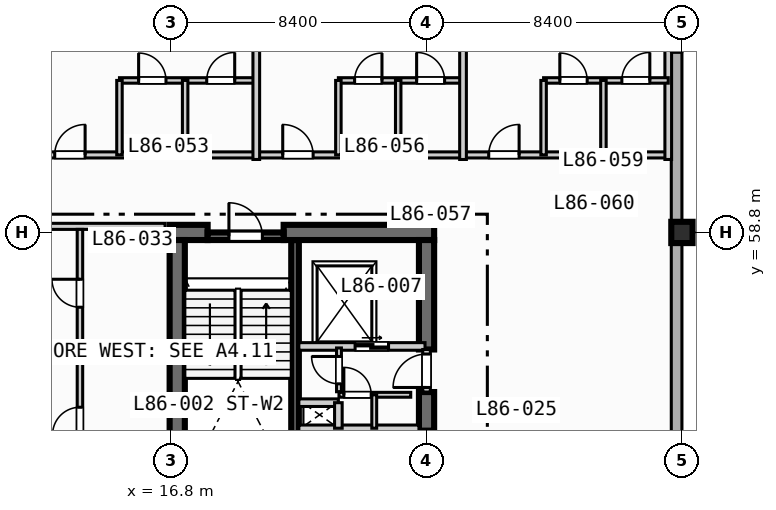
"""IFC4 building model, lengths in metres.
Left out: names, types, materials, properties, quantities, classifications, styles, units other than length and angle.
Written with IfcOpenShell. Run it as: python <this file> out.ifc"""

import sys

from ifc_helpers import new_model, si_unit, direction, frame, frame_2d, origin, origin_2d, place, context, subcontext, project, spatial, rectangle, extrude, element, fill, save


model = new_model("IFC4")
c1 = context("Model", 3, precision=1e-05, world=origin(), true_north=direction((0.0, 1.0)))
c2 = subcontext(c1, "Body", "Model", "MODEL_VIEW")
j1 = project(units=[si_unit("LENGTHUNIT", "METRE"), si_unit("PLANEANGLEUNIT", "RADIAN")], contexts=[c1])
p1 = place(None, origin())
s1 = spatial("IfcSite", under=j1, at=p1, CompositionType="ELEMENT")
p2 = place(p1, origin())
s2 = spatial("IfcBuilding", under=s1, at=p2, CompositionType="ELEMENT")
p3 = place(p2, frame((0.0, 0.0, 347.6)))
s3 = spatial("IfcBuildingStorey", under=s2, at=p3, CompositionType="ELEMENT", Elevation=347.6)
p4 = place(p3, frame((20.875, 50.5, 0.0), z_axis=(0.0, 0.0, 1.0), x_axis=(0.0, 1.0, 0.0)))
e1 = element("IfcWall", 1, at=p4, inside=s3, PredefinedType="SOLIDWALL", context=c2, shape_type="SweptSolid", body=[
    extrude(rectangle(XDim=8.05, YDim=0.25, at=frame_2d((4.025, 0.0))), origin(), (0.0, 0.0, 1.0), 3.67),
])
p5 = place(p3, frame((16.75, 58.8, 0.0), z_axis=(0.0, 0.0, 1.0), x_axis=(1.0, 0.0, 0.0)))
e2 = element("IfcWall", 2, at=p5, inside=s3, PredefinedType="SHEAR", context=c2, shape_type="SweptSolid", body=[
    extrude(rectangle(XDim=1.25, YDim=0.5, at=frame_2d((0.625, 0.0))), origin(), (0.0, 0.0, 1.0), 3.67),
])
p6 = place(p3, frame((20.5, 58.8, 0.0), z_axis=(0.0, 0.0, 1.0), x_axis=(1.0, 0.0, 0.0)))
e3 = element("IfcWall", 3, at=p6, inside=s3, PredefinedType="SHEAR", context=c2, shape_type="SweptSolid", body=[
    extrude(rectangle(XDim=4.95, YDim=0.5, at=frame_2d((2.475, 0.0))), origin(), (0.0, 0.0, 1.0), 3.67),
])
p7 = place(p3, frame((17.0, 42.2, 0.0), z_axis=(0.0, 0.0, 1.0), x_axis=(0.0, 1.0, 0.0)))
e4 = element("IfcWall", 4, at=p7, inside=s3, PredefinedType="SHEAR", context=c2, shape_type="SweptSolid", body=[
    extrude(rectangle(XDim=16.35, YDim=0.5, at=frame_2d((8.175, 0.0))), origin(), (0.0, 0.0, 1.0), 3.67),
])
p8 = place(p3, frame((25.2, 52.28, 0.0), z_axis=(0.0, 0.0, 1.0), x_axis=(0.0, 1.0, 0.0)))
e5 = element("IfcWall", 5, at=p8, inside=s3, PredefinedType="SHEAR", context=c2, shape_type="SweptSolid", body=[
    extrude(rectangle(XDim=1.27, YDim=0.5, at=frame_2d((0.635, 0.0))), origin(), (0.0, 0.0, 1.0), 3.67),
])
p9 = place(p3, frame((25.2, 54.95, 0.0), z_axis=(0.0, 0.0, 1.0), x_axis=(0.0, 1.0, 0.0)))
e6 = element("IfcWall", 6, at=p9, inside=s3, PredefinedType="SHEAR", context=c2, shape_type="SweptSolid", body=[
    extrude(rectangle(XDim=3.6, YDim=0.5, at=frame_2d((1.8, 0.0))), origin(), (0.0, 0.0, 1.0), 3.67),
])
p10 = place(p3, frame((33.6, 58.8, 0.0), z_axis=(0.0, 0.0, 1.0), x_axis=(1.0, 0.0, 0.0)))
e7 = element("IfcColumn", 7, at=p10, inside=s3, PredefinedType="COLUMN", context=c2, shape_type="SweptSolid", body=[
    extrude(rectangle(XDim=0.7, YDim=0.7, at=origin_2d()), origin(), (0.0, 0.0, 1.0), 3.9),
])
p11 = place(p3, frame((33.425, 72.425, 0.0), z_axis=(0.0, 0.0, 1.0), x_axis=(0.0, -1.0, 0.0)))
e8 = element("IfcWall", 8, at=p11, inside=s3, PredefinedType="STANDARD", context=c2, shape_type="SweptSolid", body=[
    extrude(rectangle(XDim=39.0, YDim=0.35, at=frame_2d((19.5, 0.0))), origin(), (0.0, 0.0, 1.0), 3.67),
])
p12 = place(p11, frame((5.9, 0.0, 0.85)))
e9 = element("IfcOpeningElement", 9, at=p12, cuts=e8, PredefinedType="OPENING", context=c2, shape_type="SweptSolid", body=[
    extrude(rectangle(XDim=1.8, YDim=1.8, at=frame_2d((0.9, 0.9))), frame((0.0, 0.185, 0.0), z_axis=(0.0, -1.0, 0.0), x_axis=(1.0, 0.0, 0.0)), (0.0, 0.0, 1.0), 0.37),
])
p13 = place(p3, frame((18.0, 58.675, 0.0), z_axis=(0.0, 0.0, 1.0), x_axis=(1.0, 0.0, 0.0)))
e10 = element("IfcWall", 10, at=p13, inside=s3, PredefinedType="SOLIDWALL", context=c2, shape_type="SweptSolid", body=[
    extrude(rectangle(XDim=2.5, YDim=0.25, at=frame_2d((1.25, 0.0))), origin(), (0.0, 0.0, 1.0), 3.67),
])
p14 = place(p13, frame((0.7, 0.0, 0.0)))
e11 = element("IfcOpeningElement", 11, at=p14, cuts=e10, PredefinedType="OPENING", context=c2, shape_type="SweptSolid", body=[
    extrude(rectangle(XDim=1.1, YDim=2.15, at=frame_2d((0.55, 1.075))), frame((0.0, 0.135, 0.0), z_axis=(0.0, -1.0, 0.0), x_axis=(1.0, 0.0, 0.0)), (0.0, 0.0, 1.0), 0.27),
])
p15 = place(p3, frame((21.0, 52.34, 0.0), z_axis=(0.0, 0.0, 1.0), x_axis=(1.0, 0.0, 0.0)))
e12 = element("IfcWall", 12, at=p15, inside=s3, PredefinedType="SOLIDWALL", context=c2, shape_type="SweptSolid", body=[
    extrude(rectangle(XDim=3.95, YDim=0.25, at=frame_2d((1.975, 0.0))), origin(), (0.0, 0.0, 1.0), 3.67),
])
p16 = place(p3, frame((21.0, 55.05, 0.0), z_axis=(0.0, 0.0, 1.0), x_axis=(1.0, 0.0, 0.0)))
e13 = element("IfcWall", 13, at=p16, inside=s3, PredefinedType="SOLIDWALL", context=c2, shape_type="SweptSolid", body=[
    extrude(rectangle(XDim=4.15, YDim=0.25, at=frame_2d((2.075, 0.0))), origin(), (0.0, 0.0, 1.0), 3.67),
])
p17 = place(p16, frame((1.85, 0.0, 0.0)))
e14 = element("IfcOpeningElement", 14, at=p17, cuts=e13, PredefinedType="OPENING", context=c2, shape_type="SweptSolid", body=[
    extrude(rectangle(XDim=1.1, YDim=2.15, at=frame_2d((0.55, 1.075))), frame((0.0, 0.135, 0.0), z_axis=(0.0, -1.0, 0.0), x_axis=(1.0, 0.0, 0.0)), (0.0, 0.0, 1.0), 0.27),
])
p18 = place(p3, frame((25.2, 53.55, 0.0), z_axis=(0.0, 0.0, 1.0), x_axis=(0.0, 1.0, 0.0)))
e15 = element("IfcWall", 15, at=p18, inside=s3, PredefinedType="SOLIDWALL", context=c2, shape_type="SweptSolid", body=[
    extrude(rectangle(XDim=1.4, YDim=0.25, at=frame_2d((0.7, 0.0))), origin(), (0.0, 0.0, 1.0), 3.67),
])
p19 = place(p18, frame((0.15, 0.0, 0.0)))
e16 = element("IfcOpeningElement", 16, at=p19, cuts=e15, PredefinedType="OPENING", context=c2, shape_type="SweptSolid", body=[
    extrude(rectangle(XDim=1.1, YDim=2.15, at=frame_2d((0.55, 1.075))), frame((0.0, 0.135, 0.0), z_axis=(0.0, -1.0, 0.0), x_axis=(1.0, 0.0, 0.0)), (0.0, 0.0, 1.0), 0.27),
])
p20 = place(p3, frame((21.0, 53.2, 0.0), z_axis=(0.0, 0.0, 1.0), x_axis=(1.0, 0.0, 0.0)))
e17 = element("IfcWall", 17, at=p20, inside=s3, PredefinedType="SOLIDWALL", context=c2, shape_type="SweptSolid", body=[
    extrude(rectangle(XDim=1.3, YDim=0.25, at=frame_2d((0.65, 0.0))), origin(), (0.0, 0.0, 1.0), 3.67),
])
p21 = place(p3, frame((22.3, 52.36, 0.0), z_axis=(0.0, 0.0, 1.0), x_axis=(0.0, 1.0, 0.0)))
e18 = element("IfcWall", 18, at=p21, inside=s3, PredefinedType="SOLIDWALL", context=c2, shape_type="SweptSolid", body=[
    extrude(rectangle(XDim=0.84, YDim=0.25, at=frame_2d((0.42, 0.0))), origin(), (0.0, 0.0, 1.0), 3.67),
])
p22 = place(p3, frame((22.32, 53.56, 0.0), z_axis=(0.0, 0.0, 1.0), x_axis=(0.0, 1.0, 0.0)))
e19 = element("IfcWall", 19, at=p22, inside=s3, PredefinedType="PARTITIONING", context=c2, shape_type="SweptSolid", body=[
    extrude(rectangle(XDim=1.44, YDim=0.16, at=frame_2d((0.72, 0.0))), origin(), (0.0, 0.0, 1.0), 3.67),
])
p23 = place(p22, frame((0.26, 0.0, 0.0)))
e20 = element("IfcOpeningElement", 20, at=p23, cuts=e19, PredefinedType="OPENING", context=c2, shape_type="SweptSolid", body=[
    extrude(rectangle(XDim=0.9, YDim=2.1, at=frame_2d((0.45, 1.05))), frame((0.0, 0.09, 0.0), z_axis=(0.0, -1.0, 0.0), x_axis=(1.0, 0.0, 0.0)), (0.0, 0.0, 1.0), 0.18),
])
p24 = place(p3, frame((22.32, 53.46, 0.0), z_axis=(0.0, 0.0, 1.0), x_axis=(1.0, 0.0, 0.0)))
e21 = element("IfcWall", 21, at=p24, inside=s3, PredefinedType="PARTITIONING", context=c2, shape_type="SweptSolid", body=[
    extrude(rectangle(XDim=2.36, YDim=0.16, at=frame_2d((1.18, 0.0))), origin(), (0.0, 0.0, 1.0), 3.67),
])
p25 = place(p24, frame((0.16, 0.0, 0.0)))
e22 = element("IfcOpeningElement", 22, at=p25, cuts=e21, PredefinedType="OPENING", context=c2, shape_type="SweptSolid", body=[
    extrude(rectangle(XDim=0.9, YDim=2.1, at=frame_2d((0.45, 1.05))), frame((0.0, 0.09, 0.0), z_axis=(0.0, -1.0, 0.0), x_axis=(1.0, 0.0, 0.0)), (0.0, 0.0, 1.0), 0.18),
])
p26 = place(p3, frame((23.48, 52.36, 0.0), z_axis=(0.0, 0.0, 1.0), x_axis=(0.0, 1.0, 0.0)))
e23 = element("IfcWall", 23, at=p26, inside=s3, PredefinedType="PARTITIONING", context=c2, shape_type="SweptSolid", body=[
    extrude(rectangle(XDim=1.1, YDim=0.16, at=frame_2d((0.55, 0.0))), origin(), (0.0, 0.0, 1.0), 3.67),
])
p27 = place(p3, frame((8.65, 59.0, 0.0), z_axis=(0.0, 0.0, 1.0), x_axis=(1.0, 0.0, 0.0)))
e24 = element("IfcWall", 24, at=p27, inside=s3, PredefinedType="PARTITIONING", context=c2, shape_type="SweptSolid", body=[
    extrude(rectangle(XDim=7.95, YDim=0.2, at=frame_2d((3.975, 0.0))), origin(), (0.0, 0.0, 1.0), 3.07),
])
p28 = place(p27, frame((2.0, 0.0, 0.0)))
e25 = element("IfcOpeningElement", 25, at=p28, cuts=e24, PredefinedType="OPENING", context=c2, shape_type="SweptSolid", body=[
    extrude(rectangle(XDim=1.0, YDim=2.15, at=frame_2d((0.5, 1.075))), frame((0.0, 0.11, 0.0), z_axis=(0.0, -1.0, 0.0), x_axis=(1.0, 0.0, 0.0)), (0.0, 0.0, 1.0), 0.22),
])
p29 = place(p3, frame((13.8, 50.5, 0.0), z_axis=(0.0, 0.0, 1.0), x_axis=(0.0, 1.0, 0.0)))
e26 = element("IfcWall", 26, at=p29, inside=s3, PredefinedType="PLUMBINGWALL", context=c2, shape_type="SweptSolid", body=[
    extrude(rectangle(XDim=8.4, YDim=0.18, at=frame_2d((4.2, 0.0))), origin(), (0.0, 0.0, 1.0), 3.67),
])
p30 = place(p29, frame((1.65, 0.0, 0.0)))
e27 = element("IfcOpeningElement", 27, at=p30, cuts=e26, PredefinedType="OPENING", context=c2, shape_type="SweptSolid", body=[
    extrude(rectangle(XDim=0.9, YDim=2.1, at=frame_2d((0.45, 1.05))), frame((0.0, 0.1, 0.0), z_axis=(0.0, -1.0, 0.0), x_axis=(1.0, 0.0, 0.0)), (0.0, 0.0, 1.0), 0.2),
])
p31 = place(p29, frame((5.84, 0.0, 0.0)))
e28 = element("IfcOpeningElement", 28, at=p31, cuts=e26, PredefinedType="OPENING", context=c2, shape_type="SweptSolid", body=[
    extrude(rectangle(XDim=0.92, YDim=2.1, at=frame_2d((0.46, 1.05))), frame((0.0, 0.1, 0.0), z_axis=(0.0, -1.0, 0.0), x_axis=(1.0, 0.0, 0.0)), (0.0, 0.0, 1.0), 0.2),
])
p32 = place(p3, frame((13.8, 54.7, 0.0), z_axis=(0.0, 0.0, 1.0), x_axis=(1.0, 0.0, 0.0)))
e29 = element("IfcWall", 29, at=p32, inside=s3, PredefinedType="PLUMBINGWALL", context=c2, shape_type="SweptSolid", body=[
    extrude(rectangle(XDim=2.8, YDim=0.18, at=frame_2d((1.4, 0.0))), origin(), (0.0, 0.0, 1.0), 3.67),
])
p33 = place(p3, frame((11.8, 61.35, 0.0), z_axis=(0.0, 0.0, 1.0), x_axis=(1.0, 0.0, 0.0)))
e30 = element("IfcWall", 30, at=p33, inside=s3, PredefinedType="PARTITIONING", context=c2, shape_type="SweptSolid", body=[
    extrude(rectangle(XDim=21.35, YDim=0.2, at=frame_2d((10.675, 0.0))), origin(), (0.0, 0.0, 1.0), 3.67),
])
p34 = place(p33, frame((1.17, 0.0, 0.0)))
e31 = element("IfcOpeningElement", 31, at=p34, cuts=e30, PredefinedType="OPENING", context=c2, shape_type="SweptSolid", body=[
    extrude(rectangle(XDim=1.0, YDim=2.15, at=frame_2d((0.5, 1.075))), frame((0.0, 0.11, 0.0), z_axis=(0.0, -1.0, 0.0), x_axis=(1.0, 0.0, 0.0)), (0.0, 0.0, 1.0), 0.22),
])
p35 = place(p33, frame((8.67, 0.0, 0.0)))
e32 = element("IfcOpeningElement", 32, at=p35, cuts=e30, PredefinedType="OPENING", context=c2, shape_type="SweptSolid", body=[
    extrude(rectangle(XDim=1.0, YDim=2.15, at=frame_2d((0.5, 1.075))), frame((0.0, 0.11, 0.0), z_axis=(0.0, -1.0, 0.0), x_axis=(1.0, 0.0, 0.0)), (0.0, 0.0, 1.0), 0.22),
])
p36 = place(p33, frame((15.445, 0.0, 0.0)))
e33 = element("IfcOpeningElement", 33, at=p36, cuts=e30, PredefinedType="OPENING", context=c2, shape_type="SweptSolid", body=[
    extrude(rectangle(XDim=1.0, YDim=2.15, at=frame_2d((0.5, 1.075))), frame((0.0, 0.11, 0.0), z_axis=(0.0, -1.0, 0.0), x_axis=(1.0, 0.0, 0.0)), (0.0, 0.0, 1.0), 0.22),
])
p37 = place(p3, frame((15.1, 63.8, 0.0), z_axis=(0.0, 0.0, 1.0), x_axis=(1.0, 0.0, 0.0)))
e34 = element("IfcWall", 34, at=p37, inside=s3, PredefinedType="PLUMBINGWALL", context=c2, shape_type="SweptSolid", body=[
    extrude(rectangle(XDim=4.5, YDim=0.18, at=frame_2d((2.25, 0.0))), origin(), (0.0, 0.0, 1.0), 3.67),
])
p38 = place(p37, frame((0.63, 0.0, 0.0)))
e35 = element("IfcOpeningElement", 35, at=p38, cuts=e34, PredefinedType="OPENING", context=c2, shape_type="SweptSolid", body=[
    extrude(rectangle(XDim=0.9, YDim=2.1, at=frame_2d((0.45, 1.05))), frame((0.0, 0.1, 0.0), z_axis=(0.0, -1.0, 0.0), x_axis=(1.0, 0.0, 0.0)), (0.0, 0.0, 1.0), 0.2),
])
p39 = place(p37, frame((2.87, 0.0, 0.0)))
e36 = element("IfcOpeningElement", 36, at=p39, cuts=e34, PredefinedType="OPENING", context=c2, shape_type="SweptSolid", body=[
    extrude(rectangle(XDim=0.92, YDim=2.1, at=frame_2d((0.46, 1.05))), frame((0.0, 0.1, 0.0), z_axis=(0.0, -1.0, 0.0), x_axis=(1.0, 0.0, 0.0)), (0.0, 0.0, 1.0), 0.2),
])
for number, where, z_axis, x_axis in (
    (37, (15.1, 61.35, 0.0), (0.0, 0.0, 1.0), (0.0, 1.0, 0.0)),
    (38, (17.26, 61.35, 0.0), (0.0, 0.0, 1.0), (0.0, 1.0, 0.0)),
):
    element("IfcWall", number, at=place(p3, frame(where, z_axis=z_axis, x_axis=x_axis)), inside=s3, PredefinedType="PLUMBINGWALL", context=c2, shape_type="SweptSolid", body=[
        extrude(rectangle(XDim=2.45, YDim=0.18, at=frame_2d((1.225, 0.0))), origin(), (0.0, 0.0, 1.0), 3.67),
    ])
p40 = place(p3, frame((19.6, 61.2, 0.0), z_axis=(0.0, 0.0, 1.0), x_axis=(0.0, 1.0, 0.0)))
e39 = element("IfcWall", 39, at=p40, inside=s3, PredefinedType="PARTITIONING", context=c2, shape_type="SweptSolid", body=[
    extrude(rectangle(XDim=11.38, YDim=0.22, at=frame_2d((5.69, 0.0))), origin(), (0.0, 0.0, 1.0), 3.67),
])
p41 = place(p3, frame((22.3, 63.8, 0.0), z_axis=(0.0, 0.0, 1.0), x_axis=(1.0, 0.0, 0.0)))
e40 = element("IfcWall", 40, at=p41, inside=s3, PredefinedType="PLUMBINGWALL", context=c2, shape_type="SweptSolid", body=[
    extrude(rectangle(XDim=4.1, YDim=0.18, at=frame_2d((2.05, 0.0))), origin(), (0.0, 0.0, 1.0), 3.67),
])
p42 = place(p41, frame((0.534, 0.0, 0.0)))
e41 = element("IfcOpeningElement", 41, at=p42, cuts=e40, PredefinedType="OPENING", context=c2, shape_type="SweptSolid", body=[
    extrude(rectangle(XDim=0.9, YDim=2.1, at=frame_2d((0.45, 1.05))), frame((0.0, 0.1, 0.0), z_axis=(0.0, -1.0, 0.0), x_axis=(1.0, 0.0, 0.0)), (0.0, 0.0, 1.0), 0.2),
])
p43 = place(p41, frame((2.574, 0.0, 0.0)))
e42 = element("IfcOpeningElement", 42, at=p43, cuts=e40, PredefinedType="OPENING", context=c2, shape_type="SweptSolid", body=[
    extrude(rectangle(XDim=0.92, YDim=2.1, at=frame_2d((0.46, 1.05))), frame((0.0, 0.1, 0.0), z_axis=(0.0, -1.0, 0.0), x_axis=(1.0, 0.0, 0.0)), (0.0, 0.0, 1.0), 0.2),
])
for number, where, z_axis, x_axis in (
    (43, (22.3, 61.35, 0.0), (0.0, 0.0, 1.0), (0.0, 1.0, 0.0)),
    (44, (24.268, 61.35, 0.0), (0.0, 0.0, 1.0), (0.0, 1.0, 0.0)),
):
    element("IfcWall", number, at=place(p3, frame(where, z_axis=z_axis, x_axis=x_axis)), inside=s3, PredefinedType="PLUMBINGWALL", context=c2, shape_type="SweptSolid", body=[
        extrude(rectangle(XDim=2.45, YDim=0.18, at=frame_2d((1.225, 0.0))), origin(), (0.0, 0.0, 1.0), 3.67),
    ])
for number, where, z_axis, x_axis in (
    (45, (26.4, 61.2, 0.0), (0.0, 0.0, 1.0), (0.0, 1.0, 0.0)),
    (46, (33.15, 61.2, 0.0), (0.0, 0.0, 1.0), (0.0, 1.0, 0.0)),
):
    element("IfcWall", number, at=place(p3, frame(where, z_axis=z_axis, x_axis=x_axis)), inside=s3, PredefinedType="PARTITIONING", context=c2, shape_type="SweptSolid", body=[
        extrude(rectangle(XDim=11.38, YDim=0.22, at=frame_2d((5.69, 0.0))), origin(), (0.0, 0.0, 1.0), 3.67),
    ])
p44 = place(p3, frame((29.05, 63.8, 0.0), z_axis=(0.0, 0.0, 1.0), x_axis=(1.0, 0.0, 0.0)))
e47 = element("IfcWall", 47, at=p44, inside=s3, PredefinedType="PLUMBINGWALL", context=c2, shape_type="SweptSolid", body=[
    extrude(rectangle(XDim=4.1, YDim=0.18, at=frame_2d((2.05, 0.0))), origin(), (0.0, 0.0, 1.0), 3.67),
])
p45 = place(p44, frame((0.534, 0.0, 0.0)))
e48 = element("IfcOpeningElement", 48, at=p45, cuts=e47, PredefinedType="OPENING", context=c2, shape_type="SweptSolid", body=[
    extrude(rectangle(XDim=0.9, YDim=2.1, at=frame_2d((0.45, 1.05))), frame((0.0, 0.1, 0.0), z_axis=(0.0, -1.0, 0.0), x_axis=(1.0, 0.0, 0.0)), (0.0, 0.0, 1.0), 0.2),
])
p46 = place(p44, frame((2.574, 0.0, 0.0)))
e49 = element("IfcOpeningElement", 49, at=p46, cuts=e47, PredefinedType="OPENING", context=c2, shape_type="SweptSolid", body=[
    extrude(rectangle(XDim=0.92, YDim=2.1, at=frame_2d((0.46, 1.05))), frame((0.0, 0.1, 0.0), z_axis=(0.0, -1.0, 0.0), x_axis=(1.0, 0.0, 0.0)), (0.0, 0.0, 1.0), 0.2),
])
for number, where, z_axis, x_axis in (
    (50, (29.05, 61.35, 0.0), (0.0, 0.0, 1.0), (0.0, 1.0, 0.0)),
    (51, (31.018, 61.35, 0.0), (0.0, 0.0, 1.0), (0.0, 1.0, 0.0)),
):
    element("IfcWall", number, at=place(p3, frame(where, z_axis=z_axis, x_axis=x_axis)), inside=s3, PredefinedType="PLUMBINGWALL", context=c2, shape_type="SweptSolid", body=[
        extrude(rectangle(XDim=2.45, YDim=0.18, at=frame_2d((1.225, 0.0))), origin(), (0.0, 0.0, 1.0), 3.67),
    ])
p47 = place(p14, origin())
e52 = element("IfcDoor", 52, at=p47, inside=s3, OperationType="SINGLE_SWING_LEFT", PredefinedType="DOOR", context=c2, shape_type="SweptSolid", body=[
    extrude(rectangle(XDim=1.1, YDim=2.15, at=frame_2d((0.55, 1.075))), frame((0.0, 0.025, 0.0), z_axis=(0.0, -1.0, 0.0), x_axis=(1.0, 0.0, 0.0)), (0.0, 0.0, 1.0), 0.05),
])
fill(e11, e52)
p48 = place(p17, origin())
e53 = element("IfcDoor", 53, at=p48, inside=s3, OperationType="SLIDING_TO_LEFT", PredefinedType="DOOR", context=c2, shape_type="SweptSolid", body=[
    extrude(rectangle(XDim=1.1, YDim=2.15, at=frame_2d((0.55, 1.075))), frame((0.0, 0.025, 0.0), z_axis=(0.0, -1.0, 0.0), x_axis=(1.0, 0.0, 0.0)), (0.0, 0.0, 1.0), 0.05),
])
fill(e14, e53)
p49 = place(p19, origin())
e54 = element("IfcDoor", 54, at=p49, inside=s3, OperationType="SINGLE_SWING_LEFT", PredefinedType="DOOR", context=c2, shape_type="SweptSolid", body=[
    extrude(rectangle(XDim=1.1, YDim=2.15, at=frame_2d((0.55, 1.075))), frame((0.0, 0.025, 0.0), z_axis=(0.0, -1.0, 0.0), x_axis=(1.0, 0.0, 0.0)), (0.0, 0.0, 1.0), 0.05),
])
fill(e16, e54)
p50 = place(p23, origin())
e55 = element("IfcDoor", 55, at=p50, inside=s3, OperationType="SINGLE_SWING_RIGHT", PredefinedType="DOOR", context=c2, shape_type="SweptSolid", body=[
    extrude(rectangle(XDim=0.9, YDim=2.1, at=frame_2d((0.45, 1.05))), frame((0.0, 0.025, 0.0), z_axis=(0.0, -1.0, 0.0), x_axis=(1.0, 0.0, 0.0)), (0.0, 0.0, 1.0), 0.05),
])
fill(e20, e55)
p51 = place(p25, origin())
e56 = element("IfcDoor", 56, at=p51, inside=s3, OperationType="SINGLE_SWING_LEFT", PredefinedType="DOOR", context=c2, shape_type="SweptSolid", body=[
    extrude(rectangle(XDim=0.9, YDim=2.1, at=frame_2d((0.45, 1.05))), frame((0.0, 0.025, 0.0), z_axis=(0.0, -1.0, 0.0), x_axis=(1.0, 0.0, 0.0)), (0.0, 0.0, 1.0), 0.05),
])
fill(e22, e56)
p52 = place(p30, origin())
e57 = element("IfcDoor", 57, at=p52, inside=s3, OperationType="SINGLE_SWING_LEFT", PredefinedType="DOOR", context=c2, shape_type="SweptSolid", body=[
    extrude(rectangle(XDim=0.9, YDim=2.1, at=frame_2d((0.45, 1.05))), frame((0.0, 0.025, 0.0), z_axis=(0.0, -1.0, 0.0), x_axis=(1.0, 0.0, 0.0)), (0.0, 0.0, 1.0), 0.05),
])
fill(e27, e57)
p53 = place(p31, origin())
e58 = element("IfcDoor", 58, at=p53, inside=s3, OperationType="SINGLE_SWING_RIGHT", PredefinedType="DOOR", context=c2, shape_type="SweptSolid", body=[
    extrude(rectangle(XDim=0.92, YDim=2.1, at=frame_2d((0.46, 1.05))), frame((0.0, 0.025, 0.0), z_axis=(0.0, -1.0, 0.0), x_axis=(1.0, 0.0, 0.0)), (0.0, 0.0, 1.0), 0.05),
])
fill(e28, e58)
p54 = place(p34, origin())
e59 = element("IfcDoor", 59, at=p54, inside=s3, OperationType="SINGLE_SWING_RIGHT", PredefinedType="DOOR", context=c2, shape_type="SweptSolid", body=[
    extrude(rectangle(XDim=1.0, YDim=2.15, at=frame_2d((0.5, 1.075))), frame((0.0, 0.025, 0.0), z_axis=(0.0, -1.0, 0.0), x_axis=(1.0, 0.0, 0.0)), (0.0, 0.0, 1.0), 0.05),
])
fill(e31, e59)
p55 = place(p35, origin())
e60 = element("IfcDoor", 60, at=p55, inside=s3, OperationType="SINGLE_SWING_LEFT", PredefinedType="DOOR", context=c2, shape_type="SweptSolid", body=[
    extrude(rectangle(XDim=1.0, YDim=2.15, at=frame_2d((0.5, 1.075))), frame((0.0, 0.025, 0.0), z_axis=(0.0, -1.0, 0.0), x_axis=(1.0, 0.0, 0.0)), (0.0, 0.0, 1.0), 0.05),
])
fill(e32, e60)
p56 = place(p36, origin())
e61 = element("IfcDoor", 61, at=p56, inside=s3, OperationType="SINGLE_SWING_RIGHT", PredefinedType="DOOR", context=c2, shape_type="SweptSolid", body=[
    extrude(rectangle(XDim=1.0, YDim=2.15, at=frame_2d((0.5, 1.075))), frame((0.0, 0.025, 0.0), z_axis=(0.0, -1.0, 0.0), x_axis=(1.0, 0.0, 0.0)), (0.0, 0.0, 1.0), 0.05),
])
fill(e33, e61)
p57 = place(p38, origin())
e62 = element("IfcDoor", 62, at=p57, inside=s3, OperationType="SINGLE_SWING_LEFT", PredefinedType="DOOR", context=c2, shape_type="SweptSolid", body=[
    extrude(rectangle(XDim=0.9, YDim=2.1, at=frame_2d((0.45, 1.05))), frame((0.0, 0.025, 0.0), z_axis=(0.0, -1.0, 0.0), x_axis=(1.0, 0.0, 0.0)), (0.0, 0.0, 1.0), 0.05),
])
fill(e35, e62)
p58 = place(p39, origin())
e63 = element("IfcDoor", 63, at=p58, inside=s3, OperationType="SINGLE_SWING_RIGHT", PredefinedType="DOOR", context=c2, shape_type="SweptSolid", body=[
    extrude(rectangle(XDim=0.92, YDim=2.1, at=frame_2d((0.46, 1.05))), frame((0.0, 0.025, 0.0), z_axis=(0.0, -1.0, 0.0), x_axis=(1.0, 0.0, 0.0)), (0.0, 0.0, 1.0), 0.05),
])
fill(e36, e63)
p59 = place(p42, origin())
e64 = element("IfcDoor", 64, at=p59, inside=s3, OperationType="SINGLE_SWING_RIGHT", PredefinedType="DOOR", context=c2, shape_type="SweptSolid", body=[
    extrude(rectangle(XDim=0.9, YDim=2.1, at=frame_2d((0.45, 1.05))), frame((0.0, 0.025, 0.0), z_axis=(0.0, -1.0, 0.0), x_axis=(1.0, 0.0, 0.0)), (0.0, 0.0, 1.0), 0.05),
])
fill(e41, e64)
p60 = place(p43, origin())
e65 = element("IfcDoor", 65, at=p60, inside=s3, OperationType="SINGLE_SWING_LEFT", PredefinedType="DOOR", context=c2, shape_type="SweptSolid", body=[
    extrude(rectangle(XDim=0.92, YDim=2.1, at=frame_2d((0.46, 1.05))), frame((0.0, 0.025, 0.0), z_axis=(0.0, -1.0, 0.0), x_axis=(1.0, 0.0, 0.0)), (0.0, 0.0, 1.0), 0.05),
])
fill(e42, e65)
p61 = place(p45, origin())
e66 = element("IfcDoor", 66, at=p61, inside=s3, OperationType="SINGLE_SWING_LEFT", PredefinedType="DOOR", context=c2, shape_type="SweptSolid", body=[
    extrude(rectangle(XDim=0.9, YDim=2.1, at=frame_2d((0.45, 1.05))), frame((0.0, 0.025, 0.0), z_axis=(0.0, -1.0, 0.0), x_axis=(1.0, 0.0, 0.0)), (0.0, 0.0, 1.0), 0.05),
])
fill(e48, e66)
p62 = place(p46, origin())
e67 = element("IfcDoor", 67, at=p62, inside=s3, OperationType="SINGLE_SWING_RIGHT", PredefinedType="DOOR", context=c2, shape_type="SweptSolid", body=[
    extrude(rectangle(XDim=0.92, YDim=2.1, at=frame_2d((0.46, 1.05))), frame((0.0, 0.025, 0.0), z_axis=(0.0, -1.0, 0.0), x_axis=(1.0, 0.0, 0.0)), (0.0, 0.0, 1.0), 0.05),
])
fill(e49, e67)
save(model, sys.argv[1])
